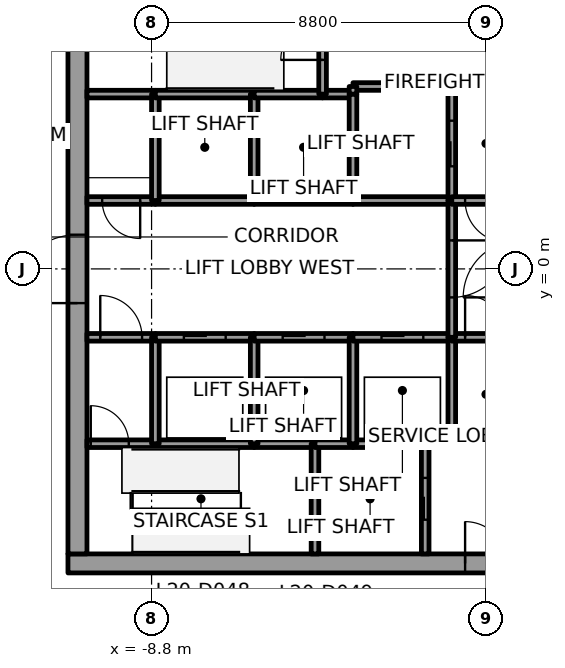
"""IFC4 building model, lengths in metres.
Left out: names, types, materials, properties, quantities, classifications, styles, units other than length and angle.
Written with IfcOpenShell. Run it as: python <this file> out.ifc"""

import sys

from ifc_helpers import new_model, si_unit, direction, frame, frame_2d, origin, place, context, subcontext, project, spatial, rectangle, extrude, element, fill, save


model = new_model("IFC4")
c1 = context("Model", 3, precision=1e-05, world=origin(), true_north=direction((0.0, 1.0)))
c2 = subcontext(c1, "Body", "Model", "MODEL_VIEW")
j1 = project(units=[si_unit("LENGTHUNIT", "METRE"), si_unit("PLANEANGLEUNIT", "RADIAN")], contexts=[c1])
p1 = place(None, origin())
s1 = spatial("IfcSite", under=j1, at=p1, CompositionType="ELEMENT")
p2 = place(p1, origin())
s2 = spatial("IfcBuilding", under=s1, at=p2, CompositionType="ELEMENT")
p3 = place(p2, frame((0.0, 0.0, 96.1)))
s3 = spatial("IfcBuildingStorey", under=s2, at=p3, CompositionType="ELEMENT", Elevation=96.1)
p4 = place(p3, frame((-11.0, -7.75, 0.0), z_axis=(0.0, 0.0, 1.0), x_axis=(1.0, 0.0, 0.0)))
e1 = element("IfcWall", 1, at=p4, inside=s3, PredefinedType="SHEAR", context=c2, shape_type="SweptSolid", body=[
    extrude(rectangle(XDim=22.0, YDim=0.5, at=frame_2d((11.0, 0.0))), origin(), (0.0, 0.0, 1.0), 3.7),
])
p5 = place(p4, frame((10.45, 0.0, 0.0)))
e2 = element("IfcOpeningElement", 2, at=p5, cuts=e1, PredefinedType="OPENING", context=c2, shape_type="SweptSolid", body=[
    extrude(rectangle(XDim=1.1, YDim=2.1, at=frame_2d((0.55, 1.05))), frame((0.0, 0.25, 0.0), z_axis=(0.0, -1.0, 0.0), x_axis=(1.0, 0.0, 0.0)), (0.0, 0.0, 1.0), 0.5),
])
p6 = place(p3, frame((-10.75, -7.5, 0.0), z_axis=(0.0, 0.0, 1.0), x_axis=(0.0, 1.0, 0.0)))
e3 = element("IfcWall", 3, at=p6, inside=s3, PredefinedType="SHEAR", context=c2, shape_type="SweptSolid", body=[
    extrude(rectangle(XDim=15.0, YDim=0.5, at=frame_2d((7.5, 0.0))), origin(), (0.0, 0.0, 1.0), 3.7),
])
p7 = place(p6, frame((6.6, 0.0, 0.0)))
e4 = element("IfcOpeningElement", 4, at=p7, cuts=e3, PredefinedType="OPENING", context=c2, shape_type="SweptSolid", body=[
    extrude(rectangle(XDim=1.8, YDim=2.1, at=frame_2d((0.9, 1.05))), frame((0.0, 0.25, 0.0), z_axis=(0.0, -1.0, 0.0), x_axis=(1.0, 0.0, 0.0)), (0.0, 0.0, 1.0), 0.5),
])
p8 = place(p3, frame((-10.5, -4.6, 0.0), z_axis=(0.0, 0.0, 1.0), x_axis=(1.0, 0.0, 0.0)))
e5 = element("IfcWall", 5, at=p8, inside=s3, PredefinedType="SOLIDWALL", context=c2, shape_type="SweptSolid", body=[
    extrude(rectangle(XDim=1.8, YDim=0.2, at=frame_2d((0.9, 0.0))), origin(), (0.0, 0.0, 1.0), 3.55),
])
p9 = place(p8, frame((0.1, 0.0, 0.0)))
e6 = element("IfcOpeningElement", 6, at=p9, cuts=e5, PredefinedType="OPENING", context=c2, shape_type="SweptSolid", body=[
    extrude(rectangle(XDim=1.0, YDim=2.1, at=frame_2d((0.5, 1.05))), frame((0.0, 0.1, 0.0), z_axis=(0.0, -1.0, 0.0), x_axis=(1.0, 0.0, 0.0)), (0.0, 0.0, 1.0), 0.2),
])
p10 = place(p3, frame((-10.5, -1.8, 0.0), z_axis=(0.0, 0.0, 1.0), x_axis=(1.0, 0.0, 0.0)))
e7 = element("IfcWall", 7, at=p10, inside=s3, PredefinedType="SOLIDWALL", context=c2, shape_type="SweptSolid", body=[
    extrude(rectangle(XDim=1.8, YDim=0.2, at=frame_2d((0.9, 0.0))), origin(), (0.0, 0.0, 1.0), 3.55),
])
p11 = place(p10, frame((0.35, 0.0, 0.0)))
e8 = element("IfcOpeningElement", 8, at=p11, cuts=e7, PredefinedType="OPENING", context=c2, shape_type="SweptSolid", body=[
    extrude(rectangle(XDim=1.1, YDim=2.1, at=frame_2d((0.55, 1.05))), frame((0.0, 0.1, 0.0), z_axis=(0.0, -1.0, 0.0), x_axis=(1.0, 0.0, 0.0)), (0.0, 0.0, 1.0), 0.2),
])
p12 = place(p3, frame((-8.7, 1.8, 0.0), z_axis=(0.0, 0.0, 1.0), x_axis=(-1.0, 0.0, 0.0)))
e9 = element("IfcWall", 9, at=p12, inside=s3, PredefinedType="SOLIDWALL", context=c2, shape_type="SweptSolid", body=[
    extrude(rectangle(XDim=1.8, YDim=0.2, at=frame_2d((0.9, 0.0))), origin(), (0.0, 0.0, 1.0), 3.55),
])
p13 = place(p12, frame((0.4, 0.0, 0.0)))
e10 = element("IfcOpeningElement", 10, at=p13, cuts=e9, PredefinedType="OPENING", context=c2, shape_type="SweptSolid", body=[
    extrude(rectangle(XDim=1.0, YDim=2.1, at=frame_2d((0.5, 1.05))), frame((0.0, 0.1, 0.0), z_axis=(0.0, -1.0, 0.0), x_axis=(1.0, 0.0, 0.0)), (0.0, 0.0, 1.0), 0.2),
])
p14 = place(p3, frame((-8.7, 4.6, 0.0), z_axis=(0.0, 0.0, 1.0), x_axis=(-1.0, 0.0, 0.0)))
e11 = element("IfcWall", 11, at=p14, inside=s3, PredefinedType="SOLIDWALL", context=c2, shape_type="SweptSolid", body=[
    extrude(rectangle(XDim=1.8, YDim=0.2, at=frame_2d((0.9, 0.0))), origin(), (0.0, 0.0, 1.0), 3.55),
])
p15 = place(p3, frame((-8.7, -4.6, 0.0), z_axis=(0.0, 0.0, 1.0), x_axis=(1.0, 0.0, 0.0)))
e12 = element("IfcWall", 12, at=p15, inside=s3, PredefinedType="SOLIDWALL", context=c2, shape_type="SweptSolid", body=[
    extrude(rectangle(XDim=2.6, YDim=0.2, at=frame_2d((1.3, 0.0))), origin(), (0.0, 0.0, 1.0), 3.55),
])
p16 = place(p3, frame((-8.7, -4.6, 0.0), z_axis=(0.0, 0.0, 1.0), x_axis=(0.0, 1.0, 0.0)))
e13 = element("IfcWall", 13, at=p16, inside=s3, PredefinedType="SOLIDWALL", context=c2, shape_type="SweptSolid", body=[
    extrude(rectangle(XDim=2.8, YDim=0.2, at=frame_2d((1.4, 0.0))), origin(), (0.0, 0.0, 1.0), 3.55),
])
p17 = place(p3, frame((-8.7, -1.8, 0.0), z_axis=(0.0, 0.0, 1.0), x_axis=(1.0, 0.0, 0.0)))
e14 = element("IfcWall", 14, at=p17, inside=s3, PredefinedType="SOLIDWALL", context=c2, shape_type="SweptSolid", body=[
    extrude(rectangle(XDim=2.6, YDim=0.2, at=frame_2d((1.3, 0.0))), origin(), (0.0, 0.0, 1.0), 3.55),
])
p18 = place(p17, frame((0.75, 0.0, 0.0)))
e15 = element("IfcOpeningElement", 15, at=p18, cuts=e14, PredefinedType="OPENING", context=c2, shape_type="SweptSolid", body=[
    extrude(rectangle(XDim=1.1, YDim=2.1, at=frame_2d((0.55, 1.05))), frame((0.0, 0.1, 0.0), z_axis=(0.0, -1.0, 0.0), x_axis=(1.0, 0.0, 0.0)), (0.0, 0.0, 1.0), 0.2),
])
p19 = place(p3, frame((-6.1, 1.8, 0.0), z_axis=(0.0, 0.0, 1.0), x_axis=(-1.0, 0.0, 0.0)))
e16 = element("IfcWall", 16, at=p19, inside=s3, PredefinedType="SOLIDWALL", context=c2, shape_type="SweptSolid", body=[
    extrude(rectangle(XDim=2.6, YDim=0.2, at=frame_2d((1.3, 0.0))), origin(), (0.0, 0.0, 1.0), 3.55),
])
p20 = place(p3, frame((-8.7, 1.8, 0.0), z_axis=(0.0, 0.0, 1.0), x_axis=(0.0, 1.0, 0.0)))
e17 = element("IfcWall", 17, at=p20, inside=s3, PredefinedType="SOLIDWALL", context=c2, shape_type="SweptSolid", body=[
    extrude(rectangle(XDim=2.8, YDim=0.2, at=frame_2d((1.4, 0.0))), origin(), (0.0, 0.0, 1.0), 3.55),
])
p21 = place(p3, frame((-6.1, 4.6, 0.0), z_axis=(0.0, 0.0, 1.0), x_axis=(-1.0, 0.0, 0.0)))
e18 = element("IfcWall", 18, at=p21, inside=s3, PredefinedType="SOLIDWALL", context=c2, shape_type="SweptSolid", body=[
    extrude(rectangle(XDim=2.6, YDim=0.2, at=frame_2d((1.3, 0.0))), origin(), (0.0, 0.0, 1.0), 3.55),
])
p22 = place(p3, frame((-6.1, -4.6, 0.0), z_axis=(0.0, 0.0, 1.0), x_axis=(1.0, 0.0, 0.0)))
e19 = element("IfcWall", 19, at=p22, inside=s3, PredefinedType="SOLIDWALL", context=c2, shape_type="SweptSolid", body=[
    extrude(rectangle(XDim=1.6, YDim=0.2, at=frame_2d((0.8, 0.0))), origin(), (0.0, 0.0, 1.0), 3.55),
])
p23 = place(p3, frame((-6.1, -4.6, 0.0), z_axis=(0.0, 0.0, 1.0), x_axis=(0.0, 1.0, 0.0)))
e20 = element("IfcWall", 20, at=p23, inside=s3, PredefinedType="SOLIDWALL", context=c2, shape_type="SweptSolid", body=[
    extrude(rectangle(XDim=2.8, YDim=0.2, at=frame_2d((1.4, 0.0))), origin(), (0.0, 0.0, 1.0), 3.55),
])
p24 = place(p3, frame((-6.1, -1.8, 0.0), z_axis=(0.0, 0.0, 1.0), x_axis=(1.0, 0.0, 0.0)))
e21 = element("IfcWall", 21, at=p24, inside=s3, PredefinedType="SOLIDWALL", context=c2, shape_type="SweptSolid", body=[
    extrude(rectangle(XDim=2.6, YDim=0.2, at=frame_2d((1.3, 0.0))), origin(), (0.0, 0.0, 1.0), 3.55),
])
p25 = place(p24, frame((0.75, 0.0, 0.0)))
e22 = element("IfcOpeningElement", 22, at=p25, cuts=e21, PredefinedType="OPENING", context=c2, shape_type="SweptSolid", body=[
    extrude(rectangle(XDim=1.1, YDim=2.1, at=frame_2d((0.55, 1.05))), frame((0.0, 0.1, 0.0), z_axis=(0.0, -1.0, 0.0), x_axis=(1.0, 0.0, 0.0)), (0.0, 0.0, 1.0), 0.2),
])
p26 = place(p3, frame((-3.5, 1.8, 0.0), z_axis=(0.0, 0.0, 1.0), x_axis=(-1.0, 0.0, 0.0)))
e23 = element("IfcWall", 23, at=p26, inside=s3, PredefinedType="SOLIDWALL", context=c2, shape_type="SweptSolid", body=[
    extrude(rectangle(XDim=2.6, YDim=0.2, at=frame_2d((1.3, 0.0))), origin(), (0.0, 0.0, 1.0), 3.55),
])
p27 = place(p3, frame((-6.1, 1.8, 0.0), z_axis=(0.0, 0.0, 1.0), x_axis=(0.0, 1.0, 0.0)))
e24 = element("IfcWall", 24, at=p27, inside=s3, PredefinedType="SOLIDWALL", context=c2, shape_type="SweptSolid", body=[
    extrude(rectangle(XDim=2.8, YDim=0.2, at=frame_2d((1.4, 0.0))), origin(), (0.0, 0.0, 1.0), 3.55),
])
p28 = place(p3, frame((-4.3, 4.6, 0.0), z_axis=(0.0, 0.0, 1.0), x_axis=(-1.0, 0.0, 0.0)))
e25 = element("IfcWall", 25, at=p28, inside=s3, PredefinedType="SOLIDWALL", context=c2, shape_type="SweptSolid", body=[
    extrude(rectangle(XDim=1.8, YDim=0.2, at=frame_2d((0.9, 0.0))), origin(), (0.0, 0.0, 1.0), 3.55),
])
p29 = place(p3, frame((-4.5, -4.6, 0.0), z_axis=(0.0, 0.0, 1.0), x_axis=(0.0, -1.0, 0.0)))
e26 = element("IfcWall", 26, at=p29, inside=s3, PredefinedType="SOLIDWALL", context=c2, shape_type="SweptSolid", body=[
    extrude(rectangle(XDim=2.9, YDim=0.2, at=frame_2d((1.45, 0.0))), origin(), (0.0, 0.0, 1.0), 3.55),
])
p30 = place(p3, frame((-4.5, -4.6, 0.0), z_axis=(0.0, 0.0, 1.0), x_axis=(1.0, 0.0, 0.0)))
e27 = element("IfcWall", 27, at=p30, inside=s3, PredefinedType="SOLIDWALL", context=c2, shape_type="SweptSolid", body=[
    extrude(rectangle(XDim=1.0, YDim=0.2, at=frame_2d((0.5, 0.0))), origin(), (0.0, 0.0, 1.0), 3.55),
])
p31 = place(p3, frame((-3.5, 4.6, 0.0), z_axis=(0.0, 0.0, 1.0), x_axis=(-1.0, 0.0, 0.0)))
e28 = element("IfcWall", 28, at=p31, inside=s3, PredefinedType="SOLIDWALL", context=c2, shape_type="SweptSolid", body=[
    extrude(rectangle(XDim=0.8, YDim=0.2, at=frame_2d((0.4, 0.0))), origin(), (0.0, 0.0, 1.0), 3.55),
])
p32 = place(p3, frame((-4.3, 4.6, 0.0), z_axis=(0.0, 0.0, 1.0), x_axis=(0.0, 1.0, 0.0)))
e29 = element("IfcWall", 29, at=p32, inside=s3, PredefinedType="SOLIDWALL", context=c2, shape_type="SweptSolid", body=[
    extrude(rectangle(XDim=2.9, YDim=0.2, at=frame_2d((1.45, 0.0))), origin(), (0.0, 0.0, 1.0), 3.55),
])
p33 = place(p32, frame((0.9, 0.0, 0.0)))
e30 = element("IfcOpeningElement", 30, at=p33, cuts=e29, PredefinedType="OPENING", context=c2, shape_type="SweptSolid", body=[
    extrude(rectangle(XDim=1.1, YDim=2.1, at=frame_2d((0.55, 1.05))), frame((0.0, 0.1, 0.0), z_axis=(0.0, -1.0, 0.0), x_axis=(1.0, 0.0, 0.0)), (0.0, 0.0, 1.0), 0.2),
])
p34 = place(p3, frame((-3.5, -4.6, 0.0), z_axis=(0.0, 0.0, 1.0), x_axis=(1.0, 0.0, 0.0)))
e31 = element("IfcWall", 31, at=p34, inside=s3, PredefinedType="SOLIDWALL", context=c2, shape_type="SweptSolid", body=[
    extrude(rectangle(XDim=1.9, YDim=0.2, at=frame_2d((0.95, 0.0))), origin(), (0.0, 0.0, 1.0), 3.55),
])
p35 = place(p3, frame((-3.5, -4.6, 0.0), z_axis=(0.0, 0.0, 1.0), x_axis=(0.0, 1.0, 0.0)))
e32 = element("IfcWall", 32, at=p35, inside=s3, PredefinedType="SOLIDWALL", context=c2, shape_type="SweptSolid", body=[
    extrude(rectangle(XDim=2.8, YDim=0.2, at=frame_2d((1.4, 0.0))), origin(), (0.0, 0.0, 1.0), 3.55),
])
p36 = place(p3, frame((-3.5, -1.8, 0.0), z_axis=(0.0, 0.0, 1.0), x_axis=(1.0, 0.0, 0.0)))
e33 = element("IfcWall", 33, at=p36, inside=s3, PredefinedType="SOLIDWALL", context=c2, shape_type="SweptSolid", body=[
    extrude(rectangle(XDim=2.6, YDim=0.2, at=frame_2d((1.3, 0.0))), origin(), (0.0, 0.0, 1.0), 3.55),
])
p37 = place(p36, frame((0.75, 0.0, 0.0)))
e34 = element("IfcOpeningElement", 34, at=p37, cuts=e33, PredefinedType="OPENING", context=c2, shape_type="SweptSolid", body=[
    extrude(rectangle(XDim=1.1, YDim=2.1, at=frame_2d((0.55, 1.05))), frame((0.0, 0.1, 0.0), z_axis=(0.0, -1.0, 0.0), x_axis=(1.0, 0.0, 0.0)), (0.0, 0.0, 1.0), 0.2),
])
p38 = place(p3, frame((-0.9, 1.8, 0.0), z_axis=(0.0, 0.0, 1.0), x_axis=(-1.0, 0.0, 0.0)))
e35 = element("IfcWall", 35, at=p38, inside=s3, PredefinedType="SOLIDWALL", context=c2, shape_type="SweptSolid", body=[
    extrude(rectangle(XDim=2.6, YDim=0.2, at=frame_2d((1.3, 0.0))), origin(), (0.0, 0.0, 1.0), 3.55),
])
p39 = place(p3, frame((-3.5, 4.6, 0.0), z_axis=(0.0, 0.0, 1.0), x_axis=(0.0, -1.0, 0.0)))
e36 = element("IfcWall", 36, at=p39, inside=s3, PredefinedType="SOLIDWALL", context=c2, shape_type="SweptSolid", body=[
    extrude(rectangle(XDim=2.8, YDim=0.2, at=frame_2d((1.4, 0.0))), origin(), (0.0, 0.0, 1.0), 3.55),
])
p40 = place(p3, frame((-0.9, 1.8, 0.0), z_axis=(0.0, 0.0, 1.0), x_axis=(0.0, 1.0, 0.0)))
e37 = element("IfcWall", 37, at=p40, inside=s3, PredefinedType="SOLIDWALL", context=c2, shape_type="SweptSolid", body=[
    extrude(rectangle(XDim=3.0, YDim=0.2, at=frame_2d((1.5, 0.0))), origin(), (0.0, 0.0, 1.0), 3.55),
])
p41 = place(p40, frame((0.9, 0.0, 0.0)))
e38 = element("IfcOpeningElement", 38, at=p41, cuts=e37, PredefinedType="OPENING", context=c2, shape_type="SweptSolid", body=[
    extrude(rectangle(XDim=1.2, YDim=2.1, at=frame_2d((0.6, 1.05))), frame((0.0, 0.1, 0.0), z_axis=(0.0, -1.0, 0.0), x_axis=(1.0, 0.0, 0.0)), (0.0, 0.0, 1.0), 0.2),
])
p42 = place(p3, frame((-0.9, 4.8, 0.0), z_axis=(0.0, 0.0, 1.0), x_axis=(-1.0, 0.0, 0.0)))
e39 = element("IfcWall", 39, at=p42, inside=s3, PredefinedType="SOLIDWALL", context=c2, shape_type="SweptSolid", body=[
    extrude(rectangle(XDim=2.6, YDim=0.2, at=frame_2d((1.3, 0.0))), origin(), (0.0, 0.0, 1.0), 3.55),
])
p43 = place(p3, frame((-3.5, 4.8, 0.0), z_axis=(0.0, 0.0, 1.0), x_axis=(0.0, -1.0, 0.0)))
e40 = element("IfcWall", 40, at=p43, inside=s3, PredefinedType="SOLIDWALL", context=c2, shape_type="SweptSolid", body=[
    extrude(rectangle(XDim=0.2, YDim=0.2, at=frame_2d((0.1, 0.0))), origin(), (0.0, 0.0, 1.0), 3.55),
])
p44 = place(p3, frame((-1.6, -7.5, 0.0), z_axis=(0.0, 0.0, 1.0), x_axis=(0.0, 1.0, 0.0)))
e41 = element("IfcWall", 41, at=p44, inside=s3, PredefinedType="SOLIDWALL", context=c2, shape_type="SweptSolid", body=[
    extrude(rectangle(XDim=2.9, YDim=0.2, at=frame_2d((1.45, 0.0))), origin(), (0.0, 0.0, 1.0), 3.55),
])
p45 = place(p44, frame((0.9, 0.0, 0.0)))
e42 = element("IfcOpeningElement", 42, at=p45, cuts=e41, PredefinedType="OPENING", context=c2, shape_type="SweptSolid", body=[
    extrude(rectangle(XDim=1.1, YDim=2.1, at=frame_2d((0.55, 1.05))), frame((0.0, 0.1, 0.0), z_axis=(0.0, -1.0, 0.0), x_axis=(1.0, 0.0, 0.0)), (0.0, 0.0, 1.0), 0.2),
])
p46 = place(p3, frame((-1.6, -4.6, 0.0), z_axis=(0.0, 0.0, 1.0), x_axis=(1.0, 0.0, 0.0)))
e43 = element("IfcWall", 43, at=p46, inside=s3, PredefinedType="SOLIDWALL", context=c2, shape_type="SweptSolid", body=[
    extrude(rectangle(XDim=0.7, YDim=0.2, at=frame_2d((0.35, 0.0))), origin(), (0.0, 0.0, 1.0), 3.55),
])
p47 = place(p3, frame((-0.9, -4.6, 0.0), z_axis=(0.0, 0.0, 1.0), x_axis=(0.0, 1.0, 0.0)))
e44 = element("IfcWall", 44, at=p47, inside=s3, PredefinedType="SOLIDWALL", context=c2, shape_type="SweptSolid", body=[
    extrude(rectangle(XDim=2.8, YDim=0.2, at=frame_2d((1.4, 0.0))), origin(), (0.0, 0.0, 1.0), 3.55),
])
p48 = place(p3, frame((-0.9, -1.8, 0.0), z_axis=(0.0, 0.0, 1.0), x_axis=(1.0, 0.0, 0.0)))
e45 = element("IfcWall", 45, at=p48, inside=s3, PredefinedType="SOLIDWALL", context=c2, shape_type="SweptSolid", body=[
    extrude(rectangle(XDim=1.8, YDim=0.2, at=frame_2d((0.9, 0.0))), origin(), (0.0, 0.0, 1.0), 3.55),
])
p49 = place(p48, frame((0.35, 0.0, 0.0)))
e46 = element("IfcOpeningElement", 46, at=p49, cuts=e45, PredefinedType="OPENING", context=c2, shape_type="SweptSolid", body=[
    extrude(rectangle(XDim=1.1, YDim=2.1, at=frame_2d((0.55, 1.05))), frame((0.0, 0.1, 0.0), z_axis=(0.0, -1.0, 0.0), x_axis=(1.0, 0.0, 0.0)), (0.0, 0.0, 1.0), 0.2),
])
p50 = place(p3, frame((-0.9, 1.8, 0.0), z_axis=(0.0, 0.0, 1.0), x_axis=(0.0, -1.0, 0.0)))
e47 = element("IfcWall", 47, at=p50, inside=s3, PredefinedType="SOLIDWALL", context=c2, shape_type="SweptSolid", body=[
    extrude(rectangle(XDim=3.6, YDim=0.2, at=frame_2d((1.8, 0.0))), origin(), (0.0, 0.0, 1.0), 3.55),
])
p51 = place(p50, frame((1.05, 0.0, 0.0)))
e48 = element("IfcOpeningElement", 48, at=p51, cuts=e47, PredefinedType="OPENING", context=c2, shape_type="SweptSolid", body=[
    extrude(rectangle(XDim=1.5, YDim=2.1, at=frame_2d((0.75, 1.05))), frame((0.0, 0.1, 0.0), z_axis=(0.0, -1.0, 0.0), x_axis=(1.0, 0.0, 0.0)), (0.0, 0.0, 1.0), 0.2),
])
p52 = place(p3, frame((0.9, 1.8, 0.0), z_axis=(0.0, 0.0, 1.0), x_axis=(-1.0, 0.0, 0.0)))
e49 = element("IfcWall", 49, at=p52, inside=s3, PredefinedType="SOLIDWALL", context=c2, shape_type="SweptSolid", body=[
    extrude(rectangle(XDim=1.8, YDim=0.2, at=frame_2d((0.9, 0.0))), origin(), (0.0, 0.0, 1.0), 3.55),
])
p53 = place(p52, frame((0.35, 0.0, 0.0)))
e50 = element("IfcOpeningElement", 50, at=p53, cuts=e49, PredefinedType="OPENING", context=c2, shape_type="SweptSolid", body=[
    extrude(rectangle(XDim=1.1, YDim=2.1, at=frame_2d((0.55, 1.05))), frame((0.0, 0.1, 0.0), z_axis=(0.0, -1.0, 0.0), x_axis=(1.0, 0.0, 0.0)), (0.0, 0.0, 1.0), 0.2),
])
p54 = place(p18, origin())
e51 = element("IfcDoor", 51, at=p54, inside=s3, OperationType="SLIDING_TO_RIGHT", PredefinedType="DOOR", context=c2, shape_type="SweptSolid", body=[
    extrude(rectangle(XDim=1.1, YDim=2.1, at=frame_2d((0.55, 1.05))), frame((0.0, 0.025, 0.0), z_axis=(0.0, -1.0, 0.0), x_axis=(1.0, 0.0, 0.0)), (0.0, 0.0, 1.0), 0.05),
])
fill(e15, e51)
p55 = place(p25, origin())
e52 = element("IfcDoor", 52, at=p55, inside=s3, OperationType="SLIDING_TO_LEFT", PredefinedType="DOOR", context=c2, shape_type="SweptSolid", body=[
    extrude(rectangle(XDim=1.1, YDim=2.1, at=frame_2d((0.55, 1.05))), frame((0.0, 0.025, 0.0), z_axis=(0.0, -1.0, 0.0), x_axis=(1.0, 0.0, 0.0)), (0.0, 0.0, 1.0), 0.05),
])
fill(e22, e52)
p56 = place(p37, origin())
e53 = element("IfcDoor", 53, at=p56, inside=s3, OperationType="SLIDING_TO_RIGHT", PredefinedType="DOOR", context=c2, shape_type="SweptSolid", body=[
    extrude(rectangle(XDim=1.1, YDim=2.1, at=frame_2d((0.55, 1.05))), frame((0.0, 0.025, 0.0), z_axis=(0.0, -1.0, 0.0), x_axis=(1.0, 0.0, 0.0)), (0.0, 0.0, 1.0), 0.05),
])
fill(e34, e53)
p57 = place(p41, origin())
e54 = element("IfcDoor", 54, at=p57, inside=s3, OperationType="SLIDING_TO_RIGHT", PredefinedType="DOOR", context=c2, shape_type="SweptSolid", body=[
    extrude(rectangle(XDim=1.2, YDim=2.1, at=frame_2d((0.6, 1.05))), frame((0.0, 0.025, 0.0), z_axis=(0.0, -1.0, 0.0), x_axis=(1.0, 0.0, 0.0)), (0.0, 0.0, 1.0), 0.05),
])
fill(e38, e54)
p58 = place(p45, origin())
e55 = element("IfcDoor", 55, at=p58, inside=s3, OperationType="SLIDING_TO_LEFT", PredefinedType="DOOR", context=c2, shape_type="SweptSolid", body=[
    extrude(rectangle(XDim=1.1, YDim=2.1, at=frame_2d((0.55, 1.05))), frame((0.0, 0.025, 0.0), z_axis=(0.0, -1.0, 0.0), x_axis=(1.0, 0.0, 0.0)), (0.0, 0.0, 1.0), 0.05),
])
fill(e42, e55)
p59 = place(p51, origin())
e56 = element("IfcDoor", 56, at=p59, inside=s3, OperationType="DOUBLE_DOOR_SINGLE_SWING", PredefinedType="DOOR", context=c2, shape_type="SweptSolid", body=[
    extrude(rectangle(XDim=1.5, YDim=2.1, at=frame_2d((0.75, 1.05))), frame((0.0, 0.025, 0.0), z_axis=(0.0, -1.0, 0.0), x_axis=(1.0, 0.0, 0.0)), (0.0, 0.0, 1.0), 0.05),
])
fill(e48, e56)
p60 = place(p11, origin())
e57 = element("IfcDoor", 57, at=p60, inside=s3, OperationType="SINGLE_SWING_LEFT", PredefinedType="DOOR", context=c2, shape_type="SweptSolid", body=[
    extrude(rectangle(XDim=1.1, YDim=2.1, at=frame_2d((0.55, 1.05))), frame((0.0, 0.025, 0.0), z_axis=(0.0, -1.0, 0.0), x_axis=(1.0, 0.0, 0.0)), (0.0, 0.0, 1.0), 0.05),
])
fill(e8, e57)
p61 = place(p53, origin())
e58 = element("IfcDoor", 58, at=p61, inside=s3, OperationType="SINGLE_SWING_LEFT", PredefinedType="DOOR", context=c2, shape_type="SweptSolid", body=[
    extrude(rectangle(XDim=1.1, YDim=2.1, at=frame_2d((0.55, 1.05))), frame((0.0, 0.025, 0.0), z_axis=(0.0, -1.0, 0.0), x_axis=(1.0, 0.0, 0.0)), (0.0, 0.0, 1.0), 0.05),
])
fill(e50, e58)
p62 = place(p49, origin())
e59 = element("IfcDoor", 59, at=p62, inside=s3, OperationType="SINGLE_SWING_RIGHT", PredefinedType="DOOR", context=c2, shape_type="SweptSolid", body=[
    extrude(rectangle(XDim=1.1, YDim=2.1, at=frame_2d((0.55, 1.05))), frame((0.0, 0.025, 0.0), z_axis=(0.0, -1.0, 0.0), x_axis=(1.0, 0.0, 0.0)), (0.0, 0.0, 1.0), 0.05),
])
fill(e46, e59)
p63 = place(p13, origin())
e60 = element("IfcDoor", 60, at=p63, inside=s3, OperationType="SINGLE_SWING_LEFT", PredefinedType="DOOR", context=c2, shape_type="SweptSolid", body=[
    extrude(rectangle(XDim=1.0, YDim=2.1, at=frame_2d((0.5, 1.05))), frame((0.0, 0.025, 0.0), z_axis=(0.0, -1.0, 0.0), x_axis=(1.0, 0.0, 0.0)), (0.0, 0.0, 1.0), 0.05),
])
fill(e10, e60)
p64 = place(p9, origin())
e61 = element("IfcDoor", 61, at=p64, inside=s3, OperationType="SINGLE_SWING_LEFT", PredefinedType="DOOR", context=c2, shape_type="SweptSolid", body=[
    extrude(rectangle(XDim=1.0, YDim=2.1, at=frame_2d((0.5, 1.05))), frame((0.0, 0.025, 0.0), z_axis=(0.0, -1.0, 0.0), x_axis=(1.0, 0.0, 0.0)), (0.0, 0.0, 1.0), 0.05),
])
fill(e6, e61)
p65 = place(p33, origin())
e62 = element("IfcDoor", 62, at=p65, inside=s3, OperationType="SINGLE_SWING_RIGHT", PredefinedType="DOOR", context=c2, shape_type="SweptSolid", body=[
    extrude(rectangle(XDim=1.1, YDim=2.1, at=frame_2d((0.55, 1.05))), frame((0.0, 0.025, 0.0), z_axis=(0.0, -1.0, 0.0), x_axis=(1.0, 0.0, 0.0)), (0.0, 0.0, 1.0), 0.05),
])
fill(e30, e62)
p66 = place(p7, origin())
e63 = element("IfcDoor", 63, at=p66, inside=s3, OperationType="DOUBLE_DOOR_SINGLE_SWING", PredefinedType="DOOR", context=c2, shape_type="SweptSolid", body=[
    extrude(rectangle(XDim=1.8, YDim=2.1, at=frame_2d((0.9, 1.05))), frame((0.0, 0.025, 0.0), z_axis=(0.0, -1.0, 0.0), x_axis=(1.0, 0.0, 0.0)), (0.0, 0.0, 1.0), 0.05),
])
fill(e4, e63)
p67 = place(p5, origin())
e64 = element("IfcDoor", 64, at=p67, inside=s3, OperationType="SINGLE_SWING_RIGHT", PredefinedType="DOOR", context=c2, shape_type="SweptSolid", body=[
    extrude(rectangle(XDim=1.1, YDim=2.1, at=frame_2d((0.55, 1.05))), frame((0.0, 0.025, 0.0), z_axis=(0.0, -1.0, 0.0), x_axis=(1.0, 0.0, 0.0)), (0.0, 0.0, 1.0), 0.05),
])
fill(e2, e64)
save(model, sys.argv[1])
